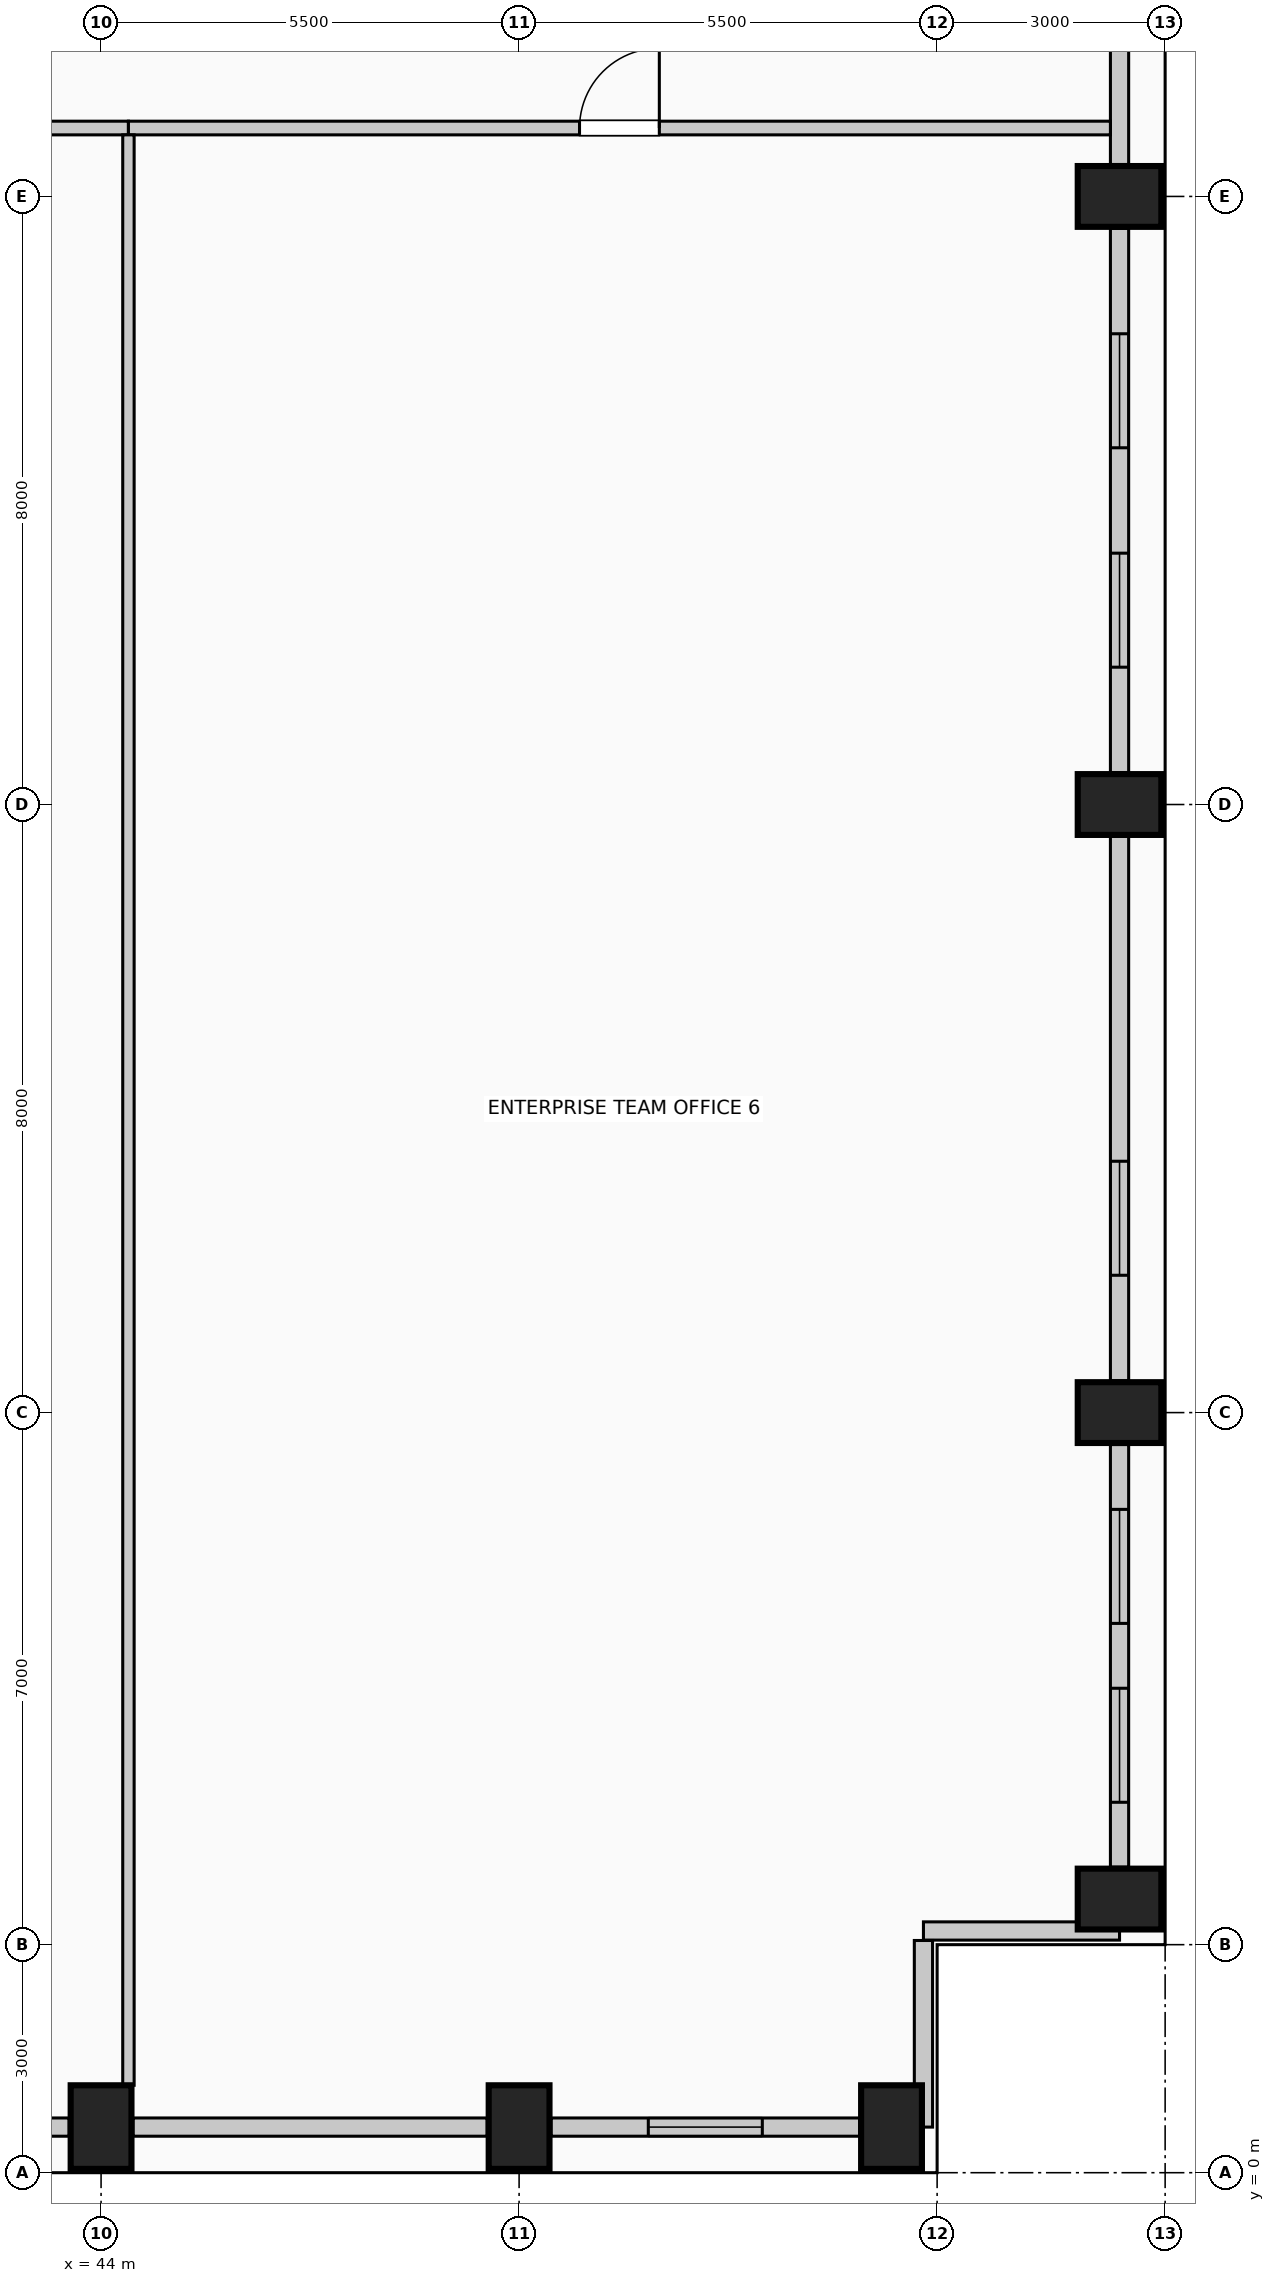
"""IFC4 building model, lengths in metres.
Left out: names, types, materials, properties, quantities, classifications, styles, units other than length and angle.
Written with IfcOpenShell. Run it as: python <this file> out.ifc"""

import sys

from ifc_helpers import new_model, si_unit, direction, frame, frame_2d, origin, origin_2d, place, context, subcontext, project, spatial, rectangle, extrude, element, fill, save


model = new_model("IFC4")
c1 = context("Model", 3, precision=1e-05, world=origin(), true_north=direction((0.0, 1.0)))
c2 = subcontext(c1, "Body", "Model", "MODEL_VIEW")
j1 = project(units=[si_unit("LENGTHUNIT", "METRE"), si_unit("PLANEANGLEUNIT", "RADIAN")], contexts=[c1])
p1 = place(None, origin())
s1 = spatial("IfcSite", under=j1, at=p1, CompositionType="ELEMENT")
p2 = place(p1, origin())
s2 = spatial("IfcBuilding", under=s1, at=p2, CompositionType="ELEMENT")
p3 = place(p2, frame((0.0, 0.0, 178.6)))
s3 = spatial("IfcBuildingStorey", under=s2, at=p3, CompositionType="ELEMENT", Elevation=178.6)
for number, where, z_axis, x_axis in (
    (1, (44.0, 0.6, 0.0), (0.0, 0.0, 1.0), (1.0, 0.0, 0.0)),
    (2, (49.5, 0.6, 0.0), (0.0, 0.0, 1.0), (1.0, 0.0, 0.0)),
    (3, (54.4, 0.6, 0.0), (0.0, 0.0, 1.0), (1.0, 0.0, 0.0)),
    (4, (57.4, 3.6, 0.0), (0.0, 0.0, 1.0), (0.0, 1.0, 0.0)),
    (5, (57.4, 10.0, 0.0), (0.0, 0.0, 1.0), (0.0, 1.0, 0.0)),
    (6, (57.4, 18.0, 0.0), (0.0, 0.0, 1.0), (0.0, 1.0, 0.0)),
    (7, (57.4, 26.0, 0.0), (0.0, 0.0, 1.0), (0.0, 1.0, 0.0)),
):
    element("IfcColumn", number, at=place(p3, frame(where, z_axis=z_axis, x_axis=x_axis)), inside=s3, PredefinedType="COLUMN", context=c2, shape_type="SweptSolid", body=[
        extrude(rectangle(XDim=0.8, YDim=1.1, at=origin_2d()), origin(), (0.0, 0.0, 1.0), 4.0),
    ])
p4 = place(p3, frame((43.58, 0.6, 0.0), z_axis=(0.0, 0.0, 1.0), x_axis=(-1.0, 0.0, 0.0)))
e8 = element("IfcWall", 8, at=p4, inside=s3, PredefinedType="SOLIDWALL", context=c2, shape_type="SweptSolid", body=[
    extrude(rectangle(XDim=1.46, YDim=0.24, at=frame_2d((0.73, 0.0))), origin(), (0.0, 0.0, 1.0), 3.0),
])
p5 = place(p3, frame((49.08, 0.6, 0.0), z_axis=(0.0, 0.0, 1.0), x_axis=(-1.0, 0.0, 0.0)))
e9 = element("IfcWall", 9, at=p5, inside=s3, PredefinedType="SOLIDWALL", context=c2, shape_type="SweptSolid", body=[
    extrude(rectangle(XDim=4.66, YDim=0.24, at=frame_2d((2.33, 0.0))), origin(), (0.0, 0.0, 1.0), 3.0),
])
p6 = place(p3, frame((53.98, 0.6, 0.0), z_axis=(0.0, 0.0, 1.0), x_axis=(-1.0, 0.0, 0.0)))
e10 = element("IfcWall", 10, at=p6, inside=s3, PredefinedType="SOLIDWALL", context=c2, shape_type="SweptSolid", body=[
    extrude(rectangle(XDim=4.06, YDim=0.24, at=frame_2d((2.03, 0.0))), origin(), (0.0, 0.0, 1.0), 3.0),
])
p7 = place(p6, frame((1.28, 0.0, 0.42)))
e11 = element("IfcOpeningElement", 11, at=p7, cuts=e10, PredefinedType="OPENING", context=c2, shape_type="SweptSolid", body=[
    extrude(rectangle(XDim=1.5, YDim=2.2, at=frame_2d((0.75, 1.1))), frame((0.0, 0.13, 0.0), z_axis=(0.0, -1.0, 0.0), x_axis=(1.0, 0.0, 0.0)), (0.0, 0.0, 1.0), 0.26),
])
p8 = place(p3, frame((57.4, 9.58, 0.0), z_axis=(0.0, 0.0, 1.0), x_axis=(0.0, -1.0, 0.0)))
e12 = element("IfcWall", 12, at=p8, inside=s3, PredefinedType="SOLIDWALL", context=c2, shape_type="SweptSolid", body=[
    extrude(rectangle(XDim=5.56, YDim=0.24, at=frame_2d((2.78, 0.0))), origin(), (0.0, 0.0, 1.0), 3.0),
])
p9 = place(p8, frame((0.853, 0.0, 0.42)))
e13 = element("IfcOpeningElement", 13, at=p9, cuts=e12, PredefinedType="OPENING", context=c2, shape_type="SweptSolid", body=[
    extrude(rectangle(XDim=1.5, YDim=2.2, at=frame_2d((0.75, 1.1))), frame((0.0, 0.13, 0.0), z_axis=(0.0, -1.0, 0.0), x_axis=(1.0, 0.0, 0.0)), (0.0, 0.0, 1.0), 0.26),
])
p10 = place(p8, frame((3.207, 0.0, 0.42)))
e14 = element("IfcOpeningElement", 14, at=p10, cuts=e12, PredefinedType="OPENING", context=c2, shape_type="SweptSolid", body=[
    extrude(rectangle(XDim=1.5, YDim=2.2, at=frame_2d((0.75, 1.1))), frame((0.0, 0.13, 0.0), z_axis=(0.0, -1.0, 0.0), x_axis=(1.0, 0.0, 0.0)), (0.0, 0.0, 1.0), 0.26),
])
p11 = place(p3, frame((57.4, 17.58, 0.0), z_axis=(0.0, 0.0, 1.0), x_axis=(0.0, -1.0, 0.0)))
e15 = element("IfcWall", 15, at=p11, inside=s3, PredefinedType="SOLIDWALL", context=c2, shape_type="SweptSolid", body=[
    extrude(rectangle(XDim=7.16, YDim=0.24, at=frame_2d((3.58, 0.0))), origin(), (0.0, 0.0, 1.0), 3.0),
])
p12 = place(p11, frame((4.273, 0.0, 0.42)))
e16 = element("IfcOpeningElement", 16, at=p12, cuts=e15, PredefinedType="OPENING", context=c2, shape_type="SweptSolid", body=[
    extrude(rectangle(XDim=1.5, YDim=2.2, at=frame_2d((0.75, 1.1))), frame((0.0, 0.13, 0.0), z_axis=(0.0, -1.0, 0.0), x_axis=(1.0, 0.0, 0.0)), (0.0, 0.0, 1.0), 0.26),
])
p13 = place(p3, frame((57.4, 25.58, 0.0), z_axis=(0.0, 0.0, 1.0), x_axis=(0.0, -1.0, 0.0)))
e17 = element("IfcWall", 17, at=p13, inside=s3, PredefinedType="SOLIDWALL", context=c2, shape_type="SweptSolid", body=[
    extrude(rectangle(XDim=7.16, YDim=0.24, at=frame_2d((3.58, 0.0))), origin(), (0.0, 0.0, 1.0), 3.0),
])
p14 = place(p13, frame((1.387, 0.0, 0.42)))
e18 = element("IfcOpeningElement", 18, at=p14, cuts=e17, PredefinedType="OPENING", context=c2, shape_type="SweptSolid", body=[
    extrude(rectangle(XDim=1.5, YDim=2.2, at=frame_2d((0.75, 1.1))), frame((0.0, 0.13, 0.0), z_axis=(0.0, -1.0, 0.0), x_axis=(1.0, 0.0, 0.0)), (0.0, 0.0, 1.0), 0.26),
])
p15 = place(p13, frame((4.273, 0.0, 0.42)))
e19 = element("IfcOpeningElement", 19, at=p15, cuts=e17, PredefinedType="OPENING", context=c2, shape_type="SweptSolid", body=[
    extrude(rectangle(XDim=1.5, YDim=2.2, at=frame_2d((0.75, 1.1))), frame((0.0, 0.13, 0.0), z_axis=(0.0, -1.0, 0.0), x_axis=(1.0, 0.0, 0.0)), (0.0, 0.0, 1.0), 0.26),
])
p16 = place(p3, frame((57.4, 33.58, 0.0), z_axis=(0.0, 0.0, 1.0), x_axis=(0.0, -1.0, 0.0)))
e20 = element("IfcWall", 20, at=p16, inside=s3, PredefinedType="SOLIDWALL", context=c2, shape_type="SweptSolid", body=[
    extrude(rectangle(XDim=7.16, YDim=0.24, at=frame_2d((3.58, 0.0))), origin(), (0.0, 0.0, 1.0), 3.0),
])
p17 = place(p3, frame((57.4, 3.18, 0.0), z_axis=(0.0, 0.0, 1.0), x_axis=(-1.0, 0.0, 0.0)))
e21 = element("IfcWall", 21, at=p17, inside=s3, PredefinedType="SOLIDWALL", context=c2, shape_type="SweptSolid", body=[
    extrude(rectangle(XDim=2.58, YDim=0.24, at=frame_2d((1.29, 0.0))), origin(), (0.0, 0.0, 1.0), 3.75),
])
p18 = place(p3, frame((54.82, 3.055, 0.0), z_axis=(0.0, 0.0, 1.0), x_axis=(0.0, -1.0, 0.0)))
e22 = element("IfcWall", 22, at=p18, inside=s3, PredefinedType="SOLIDWALL", context=c2, shape_type="SweptSolid", body=[
    extrude(rectangle(XDim=2.455, YDim=0.24, at=frame_2d((1.228, 0.0))), origin(), (0.0, 0.0, 1.0), 3.75),
])
p19 = place(p3, frame((33.36, 26.9, 0.0), z_axis=(0.0, 0.0, 1.0), x_axis=(1.0, 0.0, 0.0)))
e23 = element("IfcWall", 23, at=p19, inside=s3, PredefinedType="PARTITIONING", context=c2, shape_type="SweptSolid", body=[
    extrude(rectangle(XDim=11.0, YDim=0.18, at=frame_2d((5.5, 0.0))), origin(), (0.0, 0.0, 1.0), 3.75),
])
p20 = place(p19, frame((5.025, 0.0, 0.0)))
e24 = element("IfcOpeningElement", 24, at=p20, cuts=e23, PredefinedType="OPENING", context=c2, shape_type="SweptSolid", body=[
    extrude(rectangle(XDim=0.95, YDim=2.15, at=frame_2d((0.475, 1.075))), frame((0.0, 0.1, 0.0), z_axis=(0.0, -1.0, 0.0), x_axis=(1.0, 0.0, 0.0)), (0.0, 0.0, 1.0), 0.2),
])
p21 = place(p3, frame((44.36, 26.9, 0.0), z_axis=(0.0, 0.0, 1.0), x_axis=(1.0, 0.0, 0.0)))
e25 = element("IfcWall", 25, at=p21, inside=s3, PredefinedType="PARTITIONING", context=c2, shape_type="SweptSolid", body=[
    extrude(rectangle(XDim=12.92, YDim=0.18, at=frame_2d((6.46, 0.0))), origin(), (0.0, 0.0, 1.0), 3.75),
])
p22 = place(p21, frame((5.935, 0.0, 0.0)))
e26 = element("IfcOpeningElement", 26, at=p22, cuts=e25, PredefinedType="OPENING", context=c2, shape_type="SweptSolid", body=[
    extrude(rectangle(XDim=1.05, YDim=2.15, at=frame_2d((0.525, 1.075))), frame((0.0, 0.1, 0.0), z_axis=(0.0, -1.0, 0.0), x_axis=(1.0, 0.0, 0.0)), (0.0, 0.0, 1.0), 0.2),
])
p23 = place(p3, frame((44.36, 1.15, 0.0), z_axis=(0.0, 0.0, 1.0), x_axis=(0.0, 1.0, 0.0)))
e27 = element("IfcWall", 27, at=p23, inside=s3, PredefinedType="PARTITIONING", context=c2, shape_type="SweptSolid", body=[
    extrude(rectangle(XDim=25.66, YDim=0.15, at=frame_2d((12.83, 0.0))), origin(), (0.0, 0.0, 1.0), 3.75),
])
p24 = place(p7, origin())
e28 = element("IfcWindow", 28, at=p24, inside=s3, PartitioningType="SINGLE_PANEL", PredefinedType="WINDOW", context=c2, shape_type="SweptSolid", body=[
    extrude(rectangle(XDim=1.5, YDim=2.2, at=frame_2d((0.75, 1.1))), frame((0.0, 0.03, 0.0), z_axis=(0.0, -1.0, 0.0), x_axis=(1.0, 0.0, 0.0)), (0.0, 0.0, 1.0), 0.06),
])
fill(e11, e28)
p25 = place(p9, origin())
e29 = element("IfcWindow", 29, at=p25, inside=s3, PartitioningType="SINGLE_PANEL", PredefinedType="WINDOW", context=c2, shape_type="SweptSolid", body=[
    extrude(rectangle(XDim=1.5, YDim=2.2, at=frame_2d((0.75, 1.1))), frame((0.0, 0.03, 0.0), z_axis=(0.0, -1.0, 0.0), x_axis=(1.0, 0.0, 0.0)), (0.0, 0.0, 1.0), 0.06),
])
fill(e13, e29)
p26 = place(p10, origin())
e30 = element("IfcWindow", 30, at=p26, inside=s3, PartitioningType="SINGLE_PANEL", PredefinedType="WINDOW", context=c2, shape_type="SweptSolid", body=[
    extrude(rectangle(XDim=1.5, YDim=2.2, at=frame_2d((0.75, 1.1))), frame((0.0, 0.03, 0.0), z_axis=(0.0, -1.0, 0.0), x_axis=(1.0, 0.0, 0.0)), (0.0, 0.0, 1.0), 0.06),
])
fill(e14, e30)
p27 = place(p12, origin())
e31 = element("IfcWindow", 31, at=p27, inside=s3, PartitioningType="SINGLE_PANEL", PredefinedType="WINDOW", context=c2, shape_type="SweptSolid", body=[
    extrude(rectangle(XDim=1.5, YDim=2.2, at=frame_2d((0.75, 1.1))), frame((0.0, 0.03, 0.0), z_axis=(0.0, -1.0, 0.0), x_axis=(1.0, 0.0, 0.0)), (0.0, 0.0, 1.0), 0.06),
])
fill(e16, e31)
p28 = place(p14, origin())
e32 = element("IfcWindow", 32, at=p28, inside=s3, PartitioningType="SINGLE_PANEL", PredefinedType="WINDOW", context=c2, shape_type="SweptSolid", body=[
    extrude(rectangle(XDim=1.5, YDim=2.2, at=frame_2d((0.75, 1.1))), frame((0.0, 0.03, 0.0), z_axis=(0.0, -1.0, 0.0), x_axis=(1.0, 0.0, 0.0)), (0.0, 0.0, 1.0), 0.06),
])
fill(e18, e32)
p29 = place(p15, origin())
e33 = element("IfcWindow", 33, at=p29, inside=s3, PartitioningType="SINGLE_PANEL", PredefinedType="WINDOW", context=c2, shape_type="SweptSolid", body=[
    extrude(rectangle(XDim=1.5, YDim=2.2, at=frame_2d((0.75, 1.1))), frame((0.0, 0.03, 0.0), z_axis=(0.0, -1.0, 0.0), x_axis=(1.0, 0.0, 0.0)), (0.0, 0.0, 1.0), 0.06),
])
fill(e19, e33)
p30 = place(p22, origin())
e34 = element("IfcDoor", 34, at=p30, inside=s3, OperationType="SINGLE_SWING_RIGHT", PredefinedType="DOOR", context=c2, shape_type="SweptSolid", body=[
    extrude(rectangle(XDim=1.05, YDim=2.15, at=frame_2d((0.525, 1.075))), frame((0.0, 0.025, 0.0), z_axis=(0.0, -1.0, 0.0), x_axis=(1.0, 0.0, 0.0)), (0.0, 0.0, 1.0), 0.05),
])
fill(e26, e34)
save(model, sys.argv[1])
